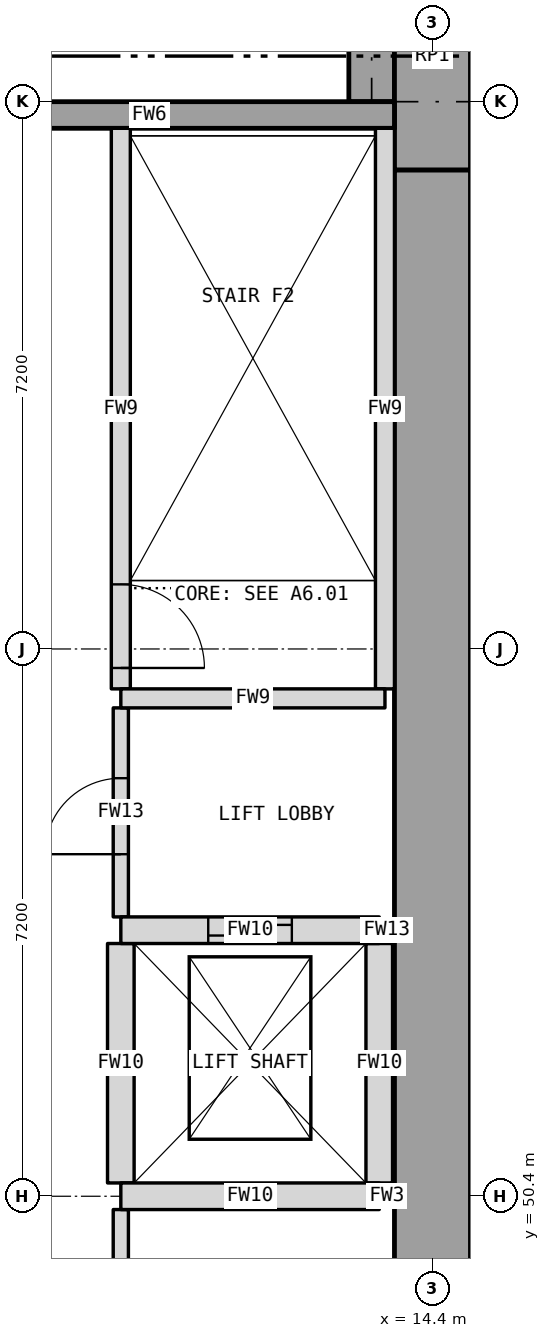
"""IFC4 building model, lengths in metres.
Left out: names, types, materials, properties, quantities, classifications, styles, units other than length and angle.
Written with IfcOpenShell. Run it as: python <this file> out.ifc"""

import sys

from ifc_helpers import new_model, si_unit, direction, frame, frame_2d, origin, place, context, subcontext, project, spatial, rectangle, extrude, element, fill, save


model = new_model("IFC4")
c1 = context("Model", 3, precision=1e-05, world=origin(), true_north=direction((0.0, 1.0)))
c2 = subcontext(c1, "Body", "Model", "MODEL_VIEW")
j1 = project(units=[si_unit("LENGTHUNIT", "METRE"), si_unit("PLANEANGLEUNIT", "RADIAN")], contexts=[c1])
p1 = place(None, origin())
s1 = spatial("IfcSite", under=j1, at=p1, CompositionType="ELEMENT")
p2 = place(p1, origin())
s2 = spatial("IfcBuilding", under=s1, at=p2, CompositionType="ELEMENT")
p3 = place(p2, frame((0.0, 0.0, 6.0)))
s3 = spatial("IfcBuildingStorey", under=s2, at=p3, CompositionType="ELEMENT", Elevation=6.0)
p4 = place(p3, frame((13.6, 64.8, 0.0), z_axis=(0.0, 0.0, 1.0), x_axis=(0.0, 1.0, 0.0)))
e1 = element("IfcWall", 1, at=p4, inside=s3, PredefinedType="SOLIDWALL", context=c2, shape_type="SweptSolid", body=[
    extrude(rectangle(XDim=7.2, YDim=0.6, at=frame_2d((3.6, 0.0))), origin(), (0.0, 0.0, 1.0), 5.35),
])
p5 = place(p4, frame((4.8, 0.0, 0.9)))
e2 = element("IfcOpeningElement", 2, at=p5, cuts=e1, PredefinedType="OPENING", context=c2, shape_type="SweptSolid", body=[
    extrude(rectangle(XDim=1.2, YDim=2.6, at=frame_2d((0.6, 1.3))), frame((0.0, 0.31, 0.0), z_axis=(0.0, -1.0, 0.0), x_axis=(1.0, 0.0, 0.0)), (0.0, 0.0, 1.0), 0.62),
])
p6 = place(p3, frame((14.4, 63.9, 0.0), z_axis=(0.0, 0.0, 1.0), x_axis=(0.0, 1.0, 0.0)))
e3 = element("IfcWall", 3, at=p6, inside=s3, PredefinedType="SOLIDWALL", context=c2, shape_type="SweptSolid", body=[
    extrude(rectangle(XDim=3.0, YDim=1.0, at=frame_2d((1.5, 0.0))), origin(), (0.0, 0.0, 1.0), 5.0),
])
p7 = place(p3, frame((14.4, 14.0, 0.0), z_axis=(0.0, 0.0, 1.0), x_axis=(0.0, 1.0, 0.0)))
e4 = element("IfcWall", 4, at=p7, inside=s3, PredefinedType="SOLIDWALL", context=c2, shape_type="SweptSolid", body=[
    extrude(rectangle(XDim=49.9, YDim=1.0, at=frame_2d((24.95, 0.0))), origin(), (0.0, 0.0, 1.0), 6.0),
])
p8 = place(p3, frame((7.45, 64.625, 0.0), z_axis=(0.0, 0.0, 1.0), x_axis=(1.0, 0.0, 0.0)))
e5 = element("IfcWall", 5, at=p8, inside=s3, PredefinedType="SOLIDWALL", context=c2, shape_type="SweptSolid", body=[
    extrude(rectangle(XDim=6.45, YDim=0.35, at=frame_2d((3.225, 0.0))), origin(), (0.0, 0.0, 1.0), 5.75),
])
p9 = place(p3, frame((10.3, 57.075, 0.0), z_axis=(0.0, 0.0, 1.0), x_axis=(0.0, 1.0, 0.0)))
e6 = element("IfcWall", 6, at=p9, inside=s3, PredefinedType="SOLIDWALL", context=c2, shape_type="SweptSolid", body=[
    extrude(rectangle(XDim=7.375, YDim=0.25, at=frame_2d((3.688, 0.0))), origin(), (0.0, 0.0, 1.0), 5.75),
])
p10 = place(p9, frame((0.275, 0.0, 0.0)))
e7 = element("IfcOpeningElement", 7, at=p10, cuts=e6, PredefinedType="OPENING", context=c2, shape_type="SweptSolid", body=[
    extrude(rectangle(XDim=1.1, YDim=2.1, at=frame_2d((0.55, 1.05))), frame((0.0, 0.135, 0.0), z_axis=(0.0, -1.0, 0.0), x_axis=(1.0, 0.0, 0.0)), (0.0, 0.0, 1.0), 0.27),
])
p11 = place(p3, frame((10.3, 50.575, 0.0), z_axis=(0.0, 0.0, 1.0), x_axis=(0.0, 1.0, 0.0)))
e8 = element("IfcWall", 8, at=p11, inside=s3, PredefinedType="SOLIDWALL", context=c2, shape_type="SweptSolid", body=[
    extrude(rectangle(XDim=3.15, YDim=0.35, at=frame_2d((1.575, 0.0))), origin(), (0.0, 0.0, 1.0), 5.75),
])
p12 = place(p3, frame((10.3, 54.075, 0.0), z_axis=(0.0, 0.0, 1.0), x_axis=(0.0, 1.0, 0.0)))
e9 = element("IfcWall", 9, at=p12, inside=s3, PredefinedType="PARTITIONING", context=c2, shape_type="SweptSolid", body=[
    extrude(rectangle(XDim=2.75, YDim=0.2, at=frame_2d((1.375, 0.0))), origin(), (0.0, 0.0, 1.0), 5.75),
])
p13 = place(p12, frame((0.825, 0.0, 0.0)))
e10 = element("IfcOpeningElement", 10, at=p13, cuts=e9, PredefinedType="OPENING", context=c2, shape_type="SweptSolid", body=[
    extrude(rectangle(XDim=1.0, YDim=2.1, at=frame_2d((0.5, 1.05))), frame((0.0, 0.11, 0.0), z_axis=(0.0, -1.0, 0.0), x_axis=(1.0, 0.0, 0.0)), (0.0, 0.0, 1.0), 0.22),
])
p14 = place(p3, frame((10.3, 14.5, 0.0), z_axis=(0.0, 0.0, 1.0), x_axis=(0.0, 1.0, 0.0)))
e11 = element("IfcWall", 11, at=p14, inside=s3, PredefinedType="PARTITIONING", context=c2, shape_type="SweptSolid", body=[
    extrude(rectangle(XDim=35.725, YDim=0.2, at=frame_2d((17.863, 0.0))), origin(), (0.0, 0.0, 1.0), 5.75),
])
p15 = place(p14, frame((7.6, 0.0, 0.0)))
e12 = element("IfcOpeningElement", 12, at=p15, cuts=e11, PredefinedType="OPENING", context=c2, shape_type="SweptSolid", body=[
    extrude(rectangle(XDim=1.8, YDim=2.1, at=frame_2d((0.9, 1.05))), frame((0.0, 0.11, 0.0), z_axis=(0.0, -1.0, 0.0), x_axis=(1.0, 0.0, 0.0)), (0.0, 0.0, 1.0), 0.22),
])
p16 = place(p14, frame((26.0, 0.0, 0.0)))
e13 = element("IfcOpeningElement", 13, at=p16, cuts=e11, PredefinedType="OPENING", context=c2, shape_type="SweptSolid", body=[
    extrude(rectangle(XDim=1.8, YDim=2.1, at=frame_2d((0.9, 1.05))), frame((0.0, 0.11, 0.0), z_axis=(0.0, -1.0, 0.0), x_axis=(1.0, 0.0, 0.0)), (0.0, 0.0, 1.0), 0.22),
])
p17 = place(p3, frame((13.7, 50.575, 0.0), z_axis=(0.0, 0.0, 1.0), x_axis=(0.0, 1.0, 0.0)))
e14 = element("IfcWall", 14, at=p17, inside=s3, PredefinedType="SOLIDWALL", context=c2, shape_type="SweptSolid", body=[
    extrude(rectangle(XDim=3.15, YDim=0.35, at=frame_2d((1.575, 0.0))), origin(), (0.0, 0.0, 1.0), 5.75),
])
p18 = place(p3, frame((13.775, 57.075, 0.0), z_axis=(0.0, 0.0, 1.0), x_axis=(0.0, 1.0, 0.0)))
e15 = element("IfcWall", 15, at=p18, inside=s3, PredefinedType="SOLIDWALL", context=c2, shape_type="SweptSolid", body=[
    extrude(rectangle(XDim=7.375, YDim=0.25, at=frame_2d((3.688, 0.0))), origin(), (0.0, 0.0, 1.0), 5.75),
])
p19 = place(p3, frame((10.3, 50.4, 0.0), z_axis=(0.0, 0.0, 1.0), x_axis=(1.0, 0.0, 0.0)))
e16 = element("IfcWall", 16, at=p19, inside=s3, PredefinedType="SOLIDWALL", context=c2, shape_type="SweptSolid", body=[
    extrude(rectangle(XDim=3.4, YDim=0.35, at=frame_2d((1.7, 0.0))), origin(), (0.0, 0.0, 1.0), 5.75),
])
p20 = place(p3, frame((13.7, 50.4, 0.0), z_axis=(0.0, 0.0, 1.0), x_axis=(1.0, 0.0, 0.0)))
e17 = element("IfcWall", 17, at=p20, inside=s3, PredefinedType="PARTITIONING", context=c2, shape_type="SweptSolid", body=[
    extrude(rectangle(XDim=0.2, YDim=0.2, at=frame_2d((0.1, 0.0))), origin(), (0.0, 0.0, 1.0), 5.75),
])
p21 = place(p3, frame((10.3, 53.9, 0.0), z_axis=(0.0, 0.0, 1.0), x_axis=(1.0, 0.0, 0.0)))
e18 = element("IfcWall", 18, at=p21, inside=s3, PredefinedType="SOLIDWALL", context=c2, shape_type="SweptSolid", body=[
    extrude(rectangle(XDim=3.4, YDim=0.35, at=frame_2d((1.7, 0.0))), origin(), (0.0, 0.0, 1.0), 5.75),
])
p22 = place(p21, frame((1.15, 0.0, 0.0)))
e19 = element("IfcOpeningElement", 19, at=p22, cuts=e18, PredefinedType="OPENING", context=c2, shape_type="SweptSolid", body=[
    extrude(rectangle(XDim=1.1, YDim=2.1, at=frame_2d((0.55, 1.05))), frame((0.0, 0.185, 0.0), z_axis=(0.0, -1.0, 0.0), x_axis=(1.0, 0.0, 0.0)), (0.0, 0.0, 1.0), 0.37),
])
p23 = place(p3, frame((13.7, 53.9, 0.0), z_axis=(0.0, 0.0, 1.0), x_axis=(1.0, 0.0, 0.0)))
e20 = element("IfcWall", 20, at=p23, inside=s3, PredefinedType="PARTITIONING", context=c2, shape_type="SweptSolid", body=[
    extrude(rectangle(XDim=0.2, YDim=0.2, at=frame_2d((0.1, 0.0))), origin(), (0.0, 0.0, 1.0), 5.75),
])
p24 = place(p3, frame((10.3, 56.95, 0.0), z_axis=(0.0, 0.0, 1.0), x_axis=(1.0, 0.0, 0.0)))
e21 = element("IfcWall", 21, at=p24, inside=s3, PredefinedType="SOLIDWALL", context=c2, shape_type="SweptSolid", body=[
    extrude(rectangle(XDim=3.475, YDim=0.25, at=frame_2d((1.737, 0.0))), origin(), (0.0, 0.0, 1.0), 5.75),
])
p25 = place(p10, frame((1.1, 0.0, 0.0), z_axis=(0.0, 0.0, 1.0), x_axis=(-1.0, 0.0, 0.0)))
e22 = element("IfcDoor", 22, at=p25, inside=s3, OperationType="SINGLE_SWING_RIGHT", PredefinedType="DOOR", context=c2, shape_type="SweptSolid", body=[
    extrude(rectangle(XDim=1.1, YDim=2.1, at=frame_2d((0.55, 1.05))), frame((0.0, 0.025, 0.0), z_axis=(0.0, -1.0, 0.0), x_axis=(1.0, 0.0, 0.0)), (0.0, 0.0, 1.0), 0.05),
])
fill(e7, e22)
p26 = place(p13, origin())
e23 = element("IfcDoor", 23, at=p26, inside=s3, OperationType="SINGLE_SWING_LEFT", PredefinedType="DOOR", context=c2, shape_type="SweptSolid", body=[
    extrude(rectangle(XDim=1.0, YDim=2.1, at=frame_2d((0.5, 1.05))), frame((0.0, 0.025, 0.0), z_axis=(0.0, -1.0, 0.0), x_axis=(1.0, 0.0, 0.0)), (0.0, 0.0, 1.0), 0.05),
])
fill(e10, e23)
p27 = place(p22, origin())
e24 = element("IfcDoor", 24, at=p27, inside=s3, OperationType="DOUBLE_DOOR_SLIDING", PredefinedType="DOOR", context=c2, shape_type="SweptSolid", body=[
    extrude(rectangle(XDim=1.1, YDim=2.1, at=frame_2d((0.55, 1.05))), frame((0.0, 0.025, 0.0), z_axis=(0.0, -1.0, 0.0), x_axis=(1.0, 0.0, 0.0)), (0.0, 0.0, 1.0), 0.05),
])
fill(e19, e24)
save(model, sys.argv[1])
